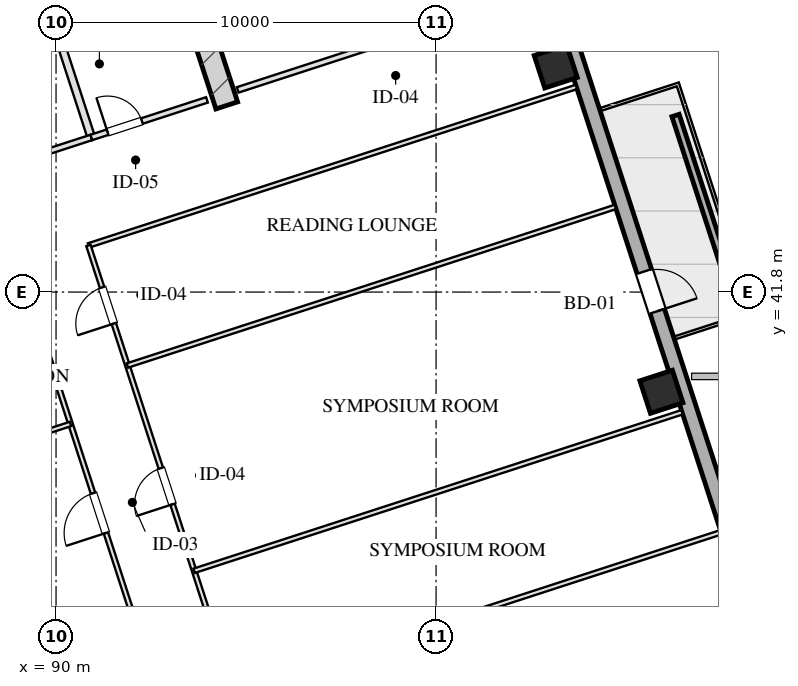
"""IFC4 building model, lengths in metres.
Left out: names, types, materials, properties, quantities, classifications, styles, units other than length and angle.
Written with IfcOpenShell. Run it as: python <this file> out.ifc"""

import sys

from ifc_helpers import new_model, si_unit, direction, frame, frame_2d, origin, origin_2d, place, context, subcontext, project, spatial, rectangle, hollow_rectangle, extrude, element, fill, save


model = new_model("IFC4")
c1 = context("Model", 3, precision=1e-05, world=origin(), true_north=direction((0.0, 1.0)))
c2 = subcontext(c1, "Body", "Model", "MODEL_VIEW")
j1 = project(units=[si_unit("LENGTHUNIT", "METRE"), si_unit("PLANEANGLEUNIT", "RADIAN")], contexts=[c1])
p1 = place(None, origin())
s1 = spatial("IfcSite", under=j1, at=p1, CompositionType="ELEMENT")
p2 = place(p1, origin())
s2 = spatial("IfcBuilding", under=s1, at=p2, CompositionType="ELEMENT")
p3 = place(p2, frame((0.0, 0.0, 120.75)))
s3 = spatial("IfcBuildingStorey", under=s2, at=p3, CompositionType="ELEMENT", Elevation=120.75)
p4 = place(p3, frame((94.492, 46.71, 0.0), z_axis=(0.0, 0.0, 1.0), x_axis=(-0.309010370028, 0.95105866865, 0.0)))
e1 = element("IfcWall", 1, at=p4, inside=s3, PredefinedType="SHEAR", context=c2, shape_type="SweptSolid", body=[
    extrude(rectangle(XDim=9.48, YDim=0.6, at=frame_2d((4.74, 0.0))), origin(), (0.0, 0.0, 1.0), 3.45),
])
for number, where, z_axis, x_axis in (
    (2, (105.93, 39.176, 0.0), (0.0, 0.0, 1.0), (0.951, 0.309, 0.0)),
    (3, (103.149, 47.736, 0.0), (0.0, 0.0, 1.0), (0.951, 0.309, 0.0)),
):
    element("IfcColumn", number, at=place(p3, frame(where, z_axis=z_axis, x_axis=x_axis)), inside=s3, PredefinedType="COLUMN", context=c2, shape_type="SweptSolid", body=[
        extrude(hollow_rectangle(XDim=0.9, YDim=0.9, WallThickness=0.032, at=origin_2d()), origin(), (0.0, 0.0, 1.0), 3.451),
    ])
p5 = place(p3, frame((99.284, 61.41, 0.0), z_axis=(0.0, 0.0, 1.0), x_axis=(0.309017542002, -0.95105633836, 0.0)))
e4 = element("IfcWall", 4, at=p5, inside=s3, PredefinedType="SOLIDWALL", context=c2, shape_type="SweptSolid", body=[
    extrude(rectangle(XDim=46.4, YDim=0.4, at=frame_2d((23.2, 0.0))), origin(), (0.0, 0.0, 1.0), 2.61),
])
p6 = place(p5, frame((20.05, 0.0, 0.0)))
e5 = element("IfcOpeningElement", 5, at=p6, cuts=e4, PredefinedType="OPENING", context=c2, shape_type="SweptSolid", body=[
    extrude(rectangle(XDim=1.1, YDim=2.15, at=frame_2d((0.55, 1.075))), frame((0.0, 0.21, 0.0), z_axis=(0.0, -1.0, 0.0), x_axis=(1.0, 0.0, 0.0)), (0.0, 0.0, 1.0), 0.42),
])
p7 = place(p3, frame((107.785, 41.882, 0.0), z_axis=(0.0, 0.0, 1.0), x_axis=(-0.309032019345, 0.951051634255, 0.0)))
e6 = element("IfcWall", 6, at=p7, inside=s3, PredefinedType="PARAPET", context=c2, shape_type="SweptSolid", body=[
    extrude(rectangle(XDim=4.8, YDim=0.2, at=frame_2d((2.4, 0.0))), origin(), (0.0, 0.0, 1.0), 0.75),
])
p8 = place(p3, frame((90.928, 45.868, 0.0), z_axis=(0.0, 0.0, 1.0), x_axis=(-0.309042196757, 0.951048327176, 0.0)))
e7 = element("IfcWall", 7, at=p8, inside=s3, PredefinedType="PARTITIONING", context=c2, shape_type="SweptSolid", body=[
    extrude(rectangle(XDim=8.43, YDim=0.2, at=frame_2d((4.215, 0.0))), origin(), (0.0, 0.0, 1.0), 3.175),
])
p9 = place(p3, frame((86.743, 44.508, 0.0), z_axis=(0.0, 0.0, 1.0), x_axis=(0.951063829732, 0.308994485023, 0.0)))
e8 = element("IfcWall", 8, at=p9, inside=s3, PredefinedType="PARTITIONING", context=c2, shape_type="SweptSolid", body=[
    extrude(rectangle(XDim=4.4, YDim=0.15, at=frame_2d((2.2, 0.0))), origin(), (0.0, 0.0, 1.0), 3.175),
])
p10 = place(p9, frame((1.45, 0.0, 0.0)))
e9 = element("IfcOpeningElement", 9, at=p10, cuts=e8, PredefinedType="OPENING", context=c2, shape_type="SweptSolid", body=[
    extrude(rectangle(XDim=1.5, YDim=2.05, at=frame_2d((0.75, 1.025))), frame((0.0, 0.085, 0.0), z_axis=(0.0, -1.0, 0.0), x_axis=(1.0, 0.0, 0.0)), (0.0, 0.0, 1.0), 0.17),
])
p11 = place(p3, frame((85.718, 47.666, 0.0), z_axis=(0.0, 0.0, 1.0), x_axis=(0.951058531764, 0.30901079133, 0.0)))
e10 = element("IfcWall", 10, at=p11, inside=s3, PredefinedType="PARTITIONING", context=c2, shape_type="SweptSolid", body=[
    extrude(rectangle(XDim=4.4, YDim=0.2, at=frame_2d((2.2, 0.0))), origin(), (0.0, 0.0, 1.0), 3.175),
])
p12 = place(p11, frame((0.45, 0.0, 0.0)))
e11 = element("IfcOpeningElement", 11, at=p12, cuts=e10, PredefinedType="OPENING", context=c2, shape_type="SweptSolid", body=[
    extrude(rectangle(XDim=1.1, YDim=2.05, at=frame_2d((0.55, 1.025))), frame((0.0, 0.11, 0.0), z_axis=(0.0, -1.0, 0.0), x_axis=(1.0, 0.0, 0.0)), (0.0, 0.0, 1.0), 0.22),
])
p13 = place(p11, frame((2.55, 0.0, 0.0)))
e12 = element("IfcOpeningElement", 12, at=p13, cuts=e10, PredefinedType="OPENING", context=c2, shape_type="SweptSolid", body=[
    extrude(rectangle(XDim=1.1, YDim=2.05, at=frame_2d((0.55, 1.025))), frame((0.0, 0.11, 0.0), z_axis=(0.0, -1.0, 0.0), x_axis=(1.0, 0.0, 0.0)), (0.0, 0.0, 1.0), 0.22),
])
p14 = place(p3, frame((90.928, 45.868, 0.0), z_axis=(0.0, 0.0, 1.0), x_axis=(0.951059297078, 0.309008435874, 0.0)))
e13 = element("IfcWall", 13, at=p14, inside=s3, PredefinedType="PARTITIONING", context=c2, shape_type="SweptSolid", body=[
    extrude(rectangle(XDim=3.2, YDim=0.15, at=frame_2d((1.6, 0.0))), origin(), (0.0, 0.0, 1.0), 3.175),
])
p15 = place(p14, frame((0.45, 0.0, 0.0)))
e14 = element("IfcOpeningElement", 14, at=p15, cuts=e13, PredefinedType="OPENING", context=c2, shape_type="SweptSolid", body=[
    extrude(rectangle(XDim=0.95, YDim=2.05, at=frame_2d((0.475, 1.025))), frame((0.0, 0.085, 0.0), z_axis=(0.0, -1.0, 0.0), x_axis=(1.0, 0.0, 0.0)), (0.0, 0.0, 1.0), 0.17),
])
p16 = place(p3, frame((94.78, 47.119, 0.0), z_axis=(0.0, 0.0, 1.0), x_axis=(0.951054329824, 0.309023723562, 0.0)))
e15 = element("IfcWall", 15, at=p16, inside=s3, PredefinedType="PARTITIONING", context=c2, shape_type="SweptSolid", body=[
    extrude(rectangle(XDim=8.5, YDim=0.15, at=frame_2d((4.25, 0.0))), origin(), (0.0, 0.0, 1.0), 3.175),
])
p17 = place(p16, frame((3.57, 0.0, 0.0)))
e16 = element("IfcOpeningElement", 16, at=p17, cuts=e15, PredefinedType="OPENING", context=c2, shape_type="SweptSolid", body=[
    extrude(rectangle(XDim=1.0, YDim=2.05, at=frame_2d((0.5, 1.025))), frame((0.0, 0.085, 0.0), z_axis=(0.0, -1.0, 0.0), x_axis=(1.0, 0.0, 0.0)), (0.0, 0.0, 1.0), 0.17),
])
p18 = place(p3, frame((90.853, 43.025, 0.0), z_axis=(0.0, 0.0, 1.0), x_axis=(0.951054001411, 0.309024734286, 0.0)))
e17 = element("IfcWall", 17, at=p18, inside=s3, PredefinedType="PARTITIONING", context=c2, shape_type="SweptSolid", body=[
    extrude(rectangle(XDim=13.5, YDim=0.12, at=frame_2d((6.75, 0.0))), origin(), (0.0, 0.0, 1.0), 3.175),
])
p19 = place(p3, frame((94.188, 26.613, 0.0), z_axis=(0.0, 0.0, 1.0), x_axis=(-0.30901773025, 0.951056277195, 0.0)))
e18 = element("IfcWall", 18, at=p19, inside=s3, PredefinedType="PARTITIONING", context=c2, shape_type="SweptSolid", body=[
    extrude(rectangle(XDim=16.64, YDim=0.12, at=frame_2d((8.32, 0.0))), origin(), (0.0, 0.0, 1.0), 3.175),
])
p20 = place(p19, frame((9.304, 0.0, 0.0)))
e19 = element("IfcOpeningElement", 19, at=p20, cuts=e18, PredefinedType="OPENING", context=c2, shape_type="SweptSolid", body=[
    extrude(rectangle(XDim=1.1, YDim=2.05, at=frame_2d((0.55, 1.025))), frame((0.0, 0.07, 0.0), z_axis=(0.0, -1.0, 0.0), x_axis=(1.0, 0.0, 0.0)), (0.0, 0.0, 1.0), 0.14),
])
p21 = place(p3, frame((95.995, 27.2, 0.0), z_axis=(0.0, 0.0, 1.0), x_axis=(-0.309022042254, 0.951054876125, 0.0)))
e20 = element("IfcWall", 20, at=p21, inside=s3, PredefinedType="PARTITIONING", context=c2, shape_type="SweptSolid", body=[
    extrude(rectangle(XDim=16.64, YDim=0.12, at=frame_2d((8.32, 0.0))), origin(), (0.0, 0.0, 1.0), 3.175),
])
p22 = place(p21, frame((1.16, 0.0, 0.0)))
e21 = element("IfcOpeningElement", 21, at=p22, cuts=e20, PredefinedType="OPENING", context=c2, shape_type="SweptSolid", body=[
    extrude(rectangle(XDim=1.0, YDim=2.05, at=frame_2d((0.5, 1.025))), frame((0.0, 0.07, 0.0), z_axis=(0.0, -1.0, 0.0), x_axis=(1.0, 0.0, 0.0)), (0.0, 0.0, 1.0), 0.14),
])
p23 = place(p21, frame((5.48, 0.0, 0.0)))
e22 = element("IfcOpeningElement", 22, at=p23, cuts=e20, PredefinedType="OPENING", context=c2, shape_type="SweptSolid", body=[
    extrude(rectangle(XDim=1.0, YDim=2.05, at=frame_2d((0.5, 1.025))), frame((0.0, 0.07, 0.0), z_axis=(0.0, -1.0, 0.0), x_axis=(1.0, 0.0, 0.0)), (0.0, 0.0, 1.0), 0.14),
])
p24 = place(p21, frame((9.48, 0.0, 0.0)))
e23 = element("IfcOpeningElement", 23, at=p24, cuts=e20, PredefinedType="OPENING", context=c2, shape_type="SweptSolid", body=[
    extrude(rectangle(XDim=1.0, YDim=2.05, at=frame_2d((0.5, 1.025))), frame((0.0, 0.07, 0.0), z_axis=(0.0, -1.0, 0.0), x_axis=(1.0, 0.0, 0.0)), (0.0, 0.0, 1.0), 0.14),
])
p25 = place(p21, frame((14.48, 0.0, 0.0)))
e24 = element("IfcOpeningElement", 24, at=p25, cuts=e20, PredefinedType="OPENING", context=c2, shape_type="SweptSolid", body=[
    extrude(rectangle(XDim=1.0, YDim=2.05, at=frame_2d((0.5, 1.025))), frame((0.0, 0.07, 0.0), z_axis=(0.0, -1.0, 0.0), x_axis=(1.0, 0.0, 0.0)), (0.0, 0.0, 1.0), 0.14),
])
p26 = place(p3, frame((82.867, 35.888, 0.0), z_axis=(0.0, 0.0, 1.0), x_axis=(0.951057231385, 0.309014793547, 0.0)))
e25 = element("IfcWall", 25, at=p26, inside=s3, PredefinedType="PARTITIONING", context=c2, shape_type="SweptSolid", body=[
    extrude(rectangle(XDim=7.9, YDim=0.12, at=frame_2d((3.95, 0.0))), origin(), (0.0, 0.0, 1.0), 3.175),
])
for number, where, z_axis, x_axis in (
    (26, (94.66, 31.308, 0.0), (0.0, 0.0, 1.0), (0.951, 0.309, 0.0)),
    (27, (93.634, 34.466, 0.0), (0.0, 0.0, 1.0), (0.951, 0.309, 0.0)),
):
    element("IfcWall", number, at=place(p3, frame(where, z_axis=z_axis, x_axis=x_axis)), inside=s3, PredefinedType="PARTITIONING", context=c2, shape_type="SweptSolid", body=[
        extrude(rectangle(XDim=13.5, YDim=0.12, at=frame_2d((6.75, 0.0))), origin(), (0.0, 0.0, 1.0), 3.175),
    ])
p27 = place(p3, frame((91.879, 39.868, 0.0), z_axis=(0.0, 0.0, 1.0), x_axis=(0.951054001411, 0.309024734286, 0.0)))
e28 = element("IfcWall", 28, at=p27, inside=s3, PredefinedType="PARTITIONING", context=c2, shape_type="SweptSolid", body=[
    extrude(rectangle(XDim=13.5, YDim=0.12, at=frame_2d((6.75, 0.0))), origin(), (0.0, 0.0, 1.0), 3.175),
])
p28 = place(p6, origin())
e29 = element("IfcDoor", 29, at=p28, inside=s3, OperationType="SINGLE_SWING_RIGHT", PredefinedType="DOOR", context=c2, shape_type="SweptSolid", body=[
    extrude(rectangle(XDim=1.1, YDim=2.15, at=frame_2d((0.55, 1.075))), frame((0.0, 0.025, 0.0), z_axis=(0.0, -1.0, 0.0), x_axis=(1.0, 0.0, 0.0)), (0.0, 0.0, 1.0), 0.05),
])
fill(e5, e29)
p29 = place(p15, origin())
e30 = element("IfcDoor", 30, at=p29, inside=s3, OperationType="SINGLE_SWING_LEFT", PredefinedType="DOOR", context=c2, shape_type="SweptSolid", body=[
    extrude(rectangle(XDim=0.95, YDim=2.05, at=frame_2d((0.475, 1.025))), frame((0.0, 0.025, 0.0), z_axis=(0.0, -1.0, 0.0), x_axis=(1.0, 0.0, 0.0)), (0.0, 0.0, 1.0), 0.05),
])
fill(e14, e30)
p30 = place(p20, origin())
e31 = element("IfcDoor", 31, at=p30, inside=s3, OperationType="SINGLE_SWING_LEFT", PredefinedType="DOOR", context=c2, shape_type="SweptSolid", body=[
    extrude(rectangle(XDim=1.1, YDim=2.05, at=frame_2d((0.55, 1.025))), frame((0.0, 0.025, 0.0), z_axis=(0.0, -1.0, 0.0), x_axis=(1.0, 0.0, 0.0)), (0.0, 0.0, 1.0), 0.05),
])
fill(e19, e31)
p31 = place(p24, origin())
e32 = element("IfcDoor", 32, at=p31, inside=s3, OperationType="SINGLE_SWING_LEFT", PredefinedType="DOOR", context=c2, shape_type="SweptSolid", body=[
    extrude(rectangle(XDim=1.0, YDim=2.05, at=frame_2d((0.5, 1.025))), frame((0.0, 0.025, 0.0), z_axis=(0.0, -1.0, 0.0), x_axis=(1.0, 0.0, 0.0)), (0.0, 0.0, 1.0), 0.05),
])
fill(e23, e32)
p32 = place(p25, origin())
e33 = element("IfcDoor", 33, at=p32, inside=s3, OperationType="SINGLE_SWING_LEFT", PredefinedType="DOOR", context=c2, shape_type="SweptSolid", body=[
    extrude(rectangle(XDim=1.0, YDim=2.05, at=frame_2d((0.5, 1.025))), frame((0.0, 0.025, 0.0), z_axis=(0.0, -1.0, 0.0), x_axis=(1.0, 0.0, 0.0)), (0.0, 0.0, 1.0), 0.05),
])
fill(e24, e33)
save(model, sys.argv[1])
